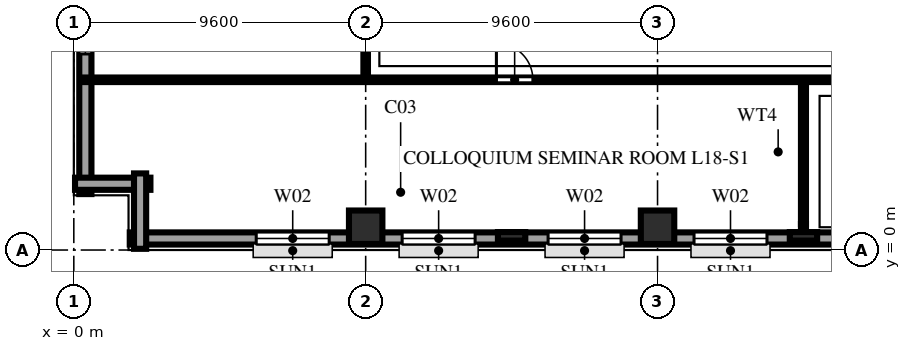
"""IFC4 building model, lengths in metres.
Left out: names, types, materials, properties, quantities, classifications, styles, units other than length and angle.
Written with IfcOpenShell. Run it as: python <this file> out.ifc"""

import sys

from ifc_helpers import new_model, si_unit, direction, frame, frame_2d, origin, origin_2d, place, context, subcontext, project, spatial, rectangle, extrude, element, fill, save


model = new_model("IFC4")
c1 = context("Model", 3, precision=1e-05, world=origin(), true_north=direction((0.0, 1.0)))
c2 = subcontext(c1, "Body", "Model", "MODEL_VIEW")
j1 = project(units=[si_unit("LENGTHUNIT", "METRE"), si_unit("PLANEANGLEUNIT", "RADIAN")], contexts=[c1])
p1 = place(None, origin())
s1 = spatial("IfcSite", under=j1, at=p1, CompositionType="ELEMENT")
p2 = place(p1, origin())
s2 = spatial("IfcBuilding", under=s1, at=p2, CompositionType="ELEMENT")
p3 = place(p2, frame((0.0, 0.0, 73.6)))
s3 = spatial("IfcBuildingStorey", under=s2, at=p3, CompositionType="ELEMENT", Elevation=73.6)
for number, where, z_axis, x_axis in (
    (1, (9.6, 0.75, 0.0), (0.0, 0.0, 1.0), (1.0, 0.0, 0.0)),
    (2, (19.2, 0.75, 0.0), (0.0, 0.0, 1.0), (1.0, 0.0, 0.0)),
):
    element("IfcColumn", number, at=place(p3, frame(where, z_axis=z_axis, x_axis=x_axis)), inside=s3, PredefinedType="COLUMN", context=c2, shape_type="SweptSolid", body=[
        extrude(rectangle(XDim=1.1, YDim=1.1, at=origin_2d()), origin(), (0.0, 0.0, 1.0), 3.8),
    ])
for number, where, z_axis, x_axis in (
    (3, (14.4, 0.45, 0.0), (0.0, 0.0, 1.0), (1.0, 0.0, 0.0)),
    (4, (24.0, 0.45, 0.0), (0.0, 0.0, 1.0), (1.0, 0.0, 0.0)),
):
    element("IfcColumn", number, at=place(p3, frame(where, z_axis=z_axis, x_axis=x_axis)), inside=s3, PredefinedType="PILASTER", context=c2, shape_type="SweptSolid", body=[
        extrude(rectangle(XDim=0.9, YDim=0.28, at=origin_2d()), origin(), (0.0, 0.0, 1.0), 3.8),
    ])
p4 = place(p3, frame((1.84, 0.38, 0.0), z_axis=(0.0, 0.0, 1.0), x_axis=(1.0, 0.0, 0.0)))
e5 = element("IfcWall", 5, at=p4, inside=s3, PredefinedType="SOLIDWALL", context=c2, shape_type="SweptSolid", body=[
    extrude(rectangle(XDim=63.52, YDim=0.4, at=frame_2d((31.76, 0.0))), origin(), (0.0, 0.0, 1.0), 3.54),
])
p5 = place(p4, frame((4.16, 0.0, 0.85)))
e6 = element("IfcOpeningElement", 6, at=p5, cuts=e5, PredefinedType="OPENING", context=c2, shape_type="SweptSolid", body=[
    extrude(rectangle(XDim=2.4, YDim=1.85, at=frame_2d((1.2, 0.925))), frame((0.0, 0.212, 0.0), z_axis=(0.0, -1.0, 0.0), x_axis=(1.0, 0.0, 0.0)), (0.0, 0.0, 1.0), 0.424),
])
p6 = place(p4, frame((8.96, 0.0, 0.85)))
e7 = element("IfcOpeningElement", 7, at=p6, cuts=e5, PredefinedType="OPENING", context=c2, shape_type="SweptSolid", body=[
    extrude(rectangle(XDim=2.4, YDim=1.85, at=frame_2d((1.2, 0.925))), frame((0.0, 0.212, 0.0), z_axis=(0.0, -1.0, 0.0), x_axis=(1.0, 0.0, 0.0)), (0.0, 0.0, 1.0), 0.424),
])
p7 = place(p4, frame((13.76, 0.0, 0.85)))
e8 = element("IfcOpeningElement", 8, at=p7, cuts=e5, PredefinedType="OPENING", context=c2, shape_type="SweptSolid", body=[
    extrude(rectangle(XDim=2.4, YDim=1.85, at=frame_2d((1.2, 0.925))), frame((0.0, 0.212, 0.0), z_axis=(0.0, -1.0, 0.0), x_axis=(1.0, 0.0, 0.0)), (0.0, 0.0, 1.0), 0.424),
])
p8 = place(p4, frame((18.56, 0.0, 0.85)))
e9 = element("IfcOpeningElement", 9, at=p8, cuts=e5, PredefinedType="OPENING", context=c2, shape_type="SweptSolid", body=[
    extrude(rectangle(XDim=2.4, YDim=1.85, at=frame_2d((1.2, 0.925))), frame((0.0, 0.212, 0.0), z_axis=(0.0, -1.0, 0.0), x_axis=(1.0, 0.0, 0.0)), (0.0, 0.0, 1.0), 0.424),
])
p9 = place(p4, frame((23.36, 0.0, 0.85)))
e10 = element("IfcOpeningElement", 10, at=p9, cuts=e5, PredefinedType="OPENING", context=c2, shape_type="SweptSolid", body=[
    extrude(rectangle(XDim=2.4, YDim=1.85, at=frame_2d((1.2, 0.925))), frame((0.0, 0.212, 0.0), z_axis=(0.0, -1.0, 0.0), x_axis=(1.0, 0.0, 0.0)), (0.0, 0.0, 1.0), 0.424),
])
p10 = place(p4, frame((28.16, 0.0, 0.85)))
e11 = element("IfcOpeningElement", 11, at=p10, cuts=e5, PredefinedType="OPENING", context=c2, shape_type="SweptSolid", body=[
    extrude(rectangle(XDim=2.4, YDim=1.85, at=frame_2d((1.2, 0.925))), frame((0.0, 0.212, 0.0), z_axis=(0.0, -1.0, 0.0), x_axis=(1.0, 0.0, 0.0)), (0.0, 0.0, 1.0), 0.424),
])
p11 = place(p3, frame((0.38, 65.36, 0.0), z_axis=(0.0, 0.0, 1.0), x_axis=(0.0, -1.0, 0.0)))
e12 = element("IfcWall", 12, at=p11, inside=s3, PredefinedType="SOLIDWALL", context=c2, shape_type="SweptSolid", body=[
    extrude(rectangle(XDim=63.52, YDim=0.4, at=frame_2d((31.76, 0.0))), origin(), (0.0, 0.0, 1.0), 3.54),
])
p12 = place(p11, frame((4.885, 0.0, 0.9)))
e13 = element("IfcOpeningElement", 13, at=p12, cuts=e12, PredefinedType="OPENING", context=c2, shape_type="SweptSolid", body=[
    extrude(rectangle(XDim=0.95, YDim=1.85, at=frame_2d((0.475, 0.925))), frame((0.0, 0.212, 0.0), z_axis=(0.0, -1.0, 0.0), x_axis=(1.0, 0.0, 0.0)), (0.0, 0.0, 1.0), 0.424),
])
p13 = place(p11, frame((9.41, 0.0, 0.9)))
e14 = element("IfcOpeningElement", 14, at=p13, cuts=e12, PredefinedType="OPENING", context=c2, shape_type="SweptSolid", body=[
    extrude(rectangle(XDim=1.5, YDim=1.85, at=frame_2d((0.75, 0.925))), frame((0.0, 0.212, 0.0), z_axis=(0.0, -1.0, 0.0), x_axis=(1.0, 0.0, 0.0)), (0.0, 0.0, 1.0), 0.424),
])
p14 = place(p11, frame((14.485, 0.0, 0.9)))
e15 = element("IfcOpeningElement", 15, at=p14, cuts=e12, PredefinedType="OPENING", context=c2, shape_type="SweptSolid", body=[
    extrude(rectangle(XDim=0.95, YDim=1.85, at=frame_2d((0.475, 0.925))), frame((0.0, 0.212, 0.0), z_axis=(0.0, -1.0, 0.0), x_axis=(1.0, 0.0, 0.0)), (0.0, 0.0, 1.0), 0.424),
])
p15 = place(p11, frame((19.01, 0.0, 0.9)))
e16 = element("IfcOpeningElement", 16, at=p15, cuts=e12, PredefinedType="OPENING", context=c2, shape_type="SweptSolid", body=[
    extrude(rectangle(XDim=1.5, YDim=1.85, at=frame_2d((0.75, 0.925))), frame((0.0, 0.212, 0.0), z_axis=(0.0, -1.0, 0.0), x_axis=(1.0, 0.0, 0.0)), (0.0, 0.0, 1.0), 0.424),
])
p16 = place(p11, frame((24.085, 0.0, 0.9)))
e17 = element("IfcOpeningElement", 17, at=p16, cuts=e12, PredefinedType="OPENING", context=c2, shape_type="SweptSolid", body=[
    extrude(rectangle(XDim=0.95, YDim=1.85, at=frame_2d((0.475, 0.925))), frame((0.0, 0.212, 0.0), z_axis=(0.0, -1.0, 0.0), x_axis=(1.0, 0.0, 0.0)), (0.0, 0.0, 1.0), 0.424),
])
p17 = place(p11, frame((28.61, 0.0, 0.9)))
e18 = element("IfcOpeningElement", 18, at=p17, cuts=e12, PredefinedType="OPENING", context=c2, shape_type="SweptSolid", body=[
    extrude(rectangle(XDim=1.5, YDim=1.85, at=frame_2d((0.75, 0.925))), frame((0.0, 0.212, 0.0), z_axis=(0.0, -1.0, 0.0), x_axis=(1.0, 0.0, 0.0)), (0.0, 0.0, 1.0), 0.424),
])
p18 = place(p11, frame((33.685, 0.0, 0.9)))
e19 = element("IfcOpeningElement", 19, at=p18, cuts=e12, PredefinedType="OPENING", context=c2, shape_type="SweptSolid", body=[
    extrude(rectangle(XDim=0.95, YDim=1.85, at=frame_2d((0.475, 0.925))), frame((0.0, 0.212, 0.0), z_axis=(0.0, -1.0, 0.0), x_axis=(1.0, 0.0, 0.0)), (0.0, 0.0, 1.0), 0.424),
])
p19 = place(p11, frame((38.21, 0.0, 0.9)))
e20 = element("IfcOpeningElement", 20, at=p19, cuts=e12, PredefinedType="OPENING", context=c2, shape_type="SweptSolid", body=[
    extrude(rectangle(XDim=1.5, YDim=1.85, at=frame_2d((0.75, 0.925))), frame((0.0, 0.212, 0.0), z_axis=(0.0, -1.0, 0.0), x_axis=(1.0, 0.0, 0.0)), (0.0, 0.0, 1.0), 0.424),
])
p20 = place(p11, frame((43.285, 0.0, 0.9)))
e21 = element("IfcOpeningElement", 21, at=p20, cuts=e12, PredefinedType="OPENING", context=c2, shape_type="SweptSolid", body=[
    extrude(rectangle(XDim=0.95, YDim=1.85, at=frame_2d((0.475, 0.925))), frame((0.0, 0.212, 0.0), z_axis=(0.0, -1.0, 0.0), x_axis=(1.0, 0.0, 0.0)), (0.0, 0.0, 1.0), 0.424),
])
p21 = place(p11, frame((47.81, 0.0, 0.9)))
e22 = element("IfcOpeningElement", 22, at=p21, cuts=e12, PredefinedType="OPENING", context=c2, shape_type="SweptSolid", body=[
    extrude(rectangle(XDim=1.5, YDim=1.85, at=frame_2d((0.75, 0.925))), frame((0.0, 0.212, 0.0), z_axis=(0.0, -1.0, 0.0), x_axis=(1.0, 0.0, 0.0)), (0.0, 0.0, 1.0), 0.424),
])
p22 = place(p11, frame((52.885, 0.0, 0.9)))
e23 = element("IfcOpeningElement", 23, at=p22, cuts=e12, PredefinedType="OPENING", context=c2, shape_type="SweptSolid", body=[
    extrude(rectangle(XDim=0.95, YDim=1.85, at=frame_2d((0.475, 0.925))), frame((0.0, 0.212, 0.0), z_axis=(0.0, -1.0, 0.0), x_axis=(1.0, 0.0, 0.0)), (0.0, 0.0, 1.0), 0.424),
])
p23 = place(p11, frame((57.41, 0.0, 0.9)))
e24 = element("IfcOpeningElement", 24, at=p23, cuts=e12, PredefinedType="OPENING", context=c2, shape_type="SweptSolid", body=[
    extrude(rectangle(XDim=1.5, YDim=1.85, at=frame_2d((0.75, 0.925))), frame((0.0, 0.212, 0.0), z_axis=(0.0, -1.0, 0.0), x_axis=(1.0, 0.0, 0.0)), (0.0, 0.0, 1.0), 0.424),
])
for number, where, z_axis, x_axis in (
    (25, (0.04, 2.18, 0.0), (0.0, 0.0, 1.0), (1.0, 0.0, 0.0)),
    (26, (2.18, 2.52, 0.0), (0.0, 0.0, 1.0), (0.0, -1.0, 0.0)),
):
    element("IfcWall", number, at=place(p3, frame(where, z_axis=z_axis, x_axis=x_axis)), inside=s3, PredefinedType="SOLIDWALL", context=c2, shape_type="SweptSolid", body=[
        extrude(rectangle(XDim=2.48, YDim=0.4, at=frame_2d((1.24, 0.0))), origin(), (0.0, 0.0, 1.0), 3.54),
    ])
p24 = place(p3, frame((9.6, 5.6, 0.0), z_axis=(0.0, 0.0, 1.0), x_axis=(0.0, 1.0, 0.0)))
e27 = element("IfcWall", 27, at=p24, inside=s3, PredefinedType="PARTITIONING", context=c2, shape_type="SweptSolid", body=[
    extrude(rectangle(XDim=4.0, YDim=0.15, at=frame_2d((2.0, 0.0))), origin(), (0.0, 0.0, 1.0), 2.996),
])
p25 = place(p3, frame((24.0, 0.22, 0.0), z_axis=(0.0, 0.0, 1.0), x_axis=(0.0, 1.0, 0.0)))
e28 = element("IfcWall", 28, at=p25, inside=s3, PredefinedType="PLUMBINGWALL", context=c2, shape_type="SweptSolid", body=[
    extrude(rectangle(XDim=0.636, YDim=0.165, at=frame_2d((0.318, 0.0))), origin(), (0.0, 0.0, 1.0), 3.54),
])
p26 = place(p3, frame((24.0, 0.856, 0.0), z_axis=(0.0, 0.0, 1.0), x_axis=(0.0, 1.0, 0.0)))
e29 = element("IfcWall", 29, at=p26, inside=s3, PredefinedType="PLUMBINGWALL", context=c2, shape_type="SweptSolid", body=[
    extrude(rectangle(XDim=4.744, YDim=0.165, at=frame_2d((2.372, 0.0))), origin(), (0.0, 0.0, 1.0), 3.007),
])
p27 = place(p3, frame((0.22, 5.6, 0.0), z_axis=(0.0, 0.0, 1.0), x_axis=(1.0, 0.0, 0.0)))
e30 = element("IfcWall", 30, at=p27, inside=s3, PredefinedType="PARTITIONING", context=c2, shape_type="SweptSolid", body=[
    extrude(rectangle(XDim=52.58, YDim=0.15, at=frame_2d((26.29, 0.0))), origin(), (0.0, 0.0, 1.0), 3.54),
])
p28 = place(p27, frame((13.68, 0.0, 0.0)))
e31 = element("IfcOpeningElement", 31, at=p28, cuts=e30, PredefinedType="OPENING", context=c2, shape_type="SweptSolid", body=[
    extrude(rectangle(XDim=1.2, YDim=2.2, at=frame_2d((0.6, 1.1))), frame((0.0, 0.087, 0.0), z_axis=(0.0, -1.0, 0.0), x_axis=(1.0, 0.0, 0.0)), (0.0, 0.0, 1.0), 0.174),
])
p29 = place(p27, frame((32.33, 0.0, 0.0)))
e32 = element("IfcOpeningElement", 32, at=p29, cuts=e30, PredefinedType="OPENING", context=c2, shape_type="SweptSolid", body=[
    extrude(rectangle(XDim=1.2, YDim=2.2, at=frame_2d((0.6, 1.1))), frame((0.0, 0.087, 0.0), z_axis=(0.0, -1.0, 0.0), x_axis=(1.0, 0.0, 0.0)), (0.0, 0.0, 1.0), 0.174),
])
p30 = place(p27, frame((41.73, 0.0, 0.0)))
e33 = element("IfcOpeningElement", 33, at=p30, cuts=e30, PredefinedType="OPENING", context=c2, shape_type="SweptSolid", body=[
    extrude(rectangle(XDim=1.2, YDim=2.2, at=frame_2d((0.6, 1.1))), frame((0.0, 0.087, 0.0), z_axis=(0.0, -1.0, 0.0), x_axis=(1.0, 0.0, 0.0)), (0.0, 0.0, 1.0), 0.174),
])
p31 = place(p5, origin())
e34 = element("IfcWindow", 34, at=p31, inside=s3, PartitioningType="TRIPLE_PANEL_VERTICAL", PredefinedType="WINDOW", context=c2, shape_type="SweptSolid", body=[
    extrude(rectangle(XDim=2.4, YDim=1.85, at=frame_2d((1.2, 0.925))), frame((0.0, 0.11, 0.0), z_axis=(0.0, -1.0, 0.0), x_axis=(1.0, 0.0, 0.0)), (0.0, 0.0, 1.0), 0.06),
])
fill(e6, e34)
p32 = place(p6, origin())
e35 = element("IfcWindow", 35, at=p32, inside=s3, PartitioningType="TRIPLE_PANEL_VERTICAL", PredefinedType="WINDOW", context=c2, shape_type="SweptSolid", body=[
    extrude(rectangle(XDim=2.4, YDim=1.85, at=frame_2d((1.2, 0.925))), frame((0.0, 0.11, 0.0), z_axis=(0.0, -1.0, 0.0), x_axis=(1.0, 0.0, 0.0)), (0.0, 0.0, 1.0), 0.06),
])
fill(e7, e35)
p33 = place(p7, origin())
e36 = element("IfcWindow", 36, at=p33, inside=s3, PartitioningType="TRIPLE_PANEL_VERTICAL", PredefinedType="WINDOW", context=c2, shape_type="SweptSolid", body=[
    extrude(rectangle(XDim=2.4, YDim=1.85, at=frame_2d((1.2, 0.925))), frame((0.0, 0.11, 0.0), z_axis=(0.0, -1.0, 0.0), x_axis=(1.0, 0.0, 0.0)), (0.0, 0.0, 1.0), 0.06),
])
fill(e8, e36)
p34 = place(p8, origin())
e37 = element("IfcWindow", 37, at=p34, inside=s3, PartitioningType="TRIPLE_PANEL_VERTICAL", PredefinedType="WINDOW", context=c2, shape_type="SweptSolid", body=[
    extrude(rectangle(XDim=2.4, YDim=1.85, at=frame_2d((1.2, 0.925))), frame((0.0, 0.11, 0.0), z_axis=(0.0, -1.0, 0.0), x_axis=(1.0, 0.0, 0.0)), (0.0, 0.0, 1.0), 0.06),
])
fill(e9, e37)
p35 = place(p23, origin())
e38 = element("IfcWindow", 38, at=p35, inside=s3, PartitioningType="DOUBLE_PANEL_VERTICAL", PredefinedType="WINDOW", context=c2, shape_type="SweptSolid", body=[
    extrude(rectangle(XDim=1.5, YDim=1.85, at=frame_2d((0.75, 0.925))), frame((0.0, 0.11, 0.0), z_axis=(0.0, -1.0, 0.0), x_axis=(1.0, 0.0, 0.0)), (0.0, 0.0, 1.0), 0.06),
])
fill(e24, e38)
p36 = place(p28, origin())
e39 = element("IfcDoor", 39, at=p36, inside=s3, OperationType="SINGLE_SWING_LEFT", PredefinedType="DOOR", context=c2, shape_type="SweptSolid", body=[
    extrude(rectangle(XDim=1.2, YDim=2.2, at=frame_2d((0.6, 1.1))), frame((0.0, 0.025, 0.0), z_axis=(0.0, -1.0, 0.0), x_axis=(1.0, 0.0, 0.0)), (0.0, 0.0, 1.0), 0.05),
])
fill(e31, e39)
save(model, sys.argv[1])
